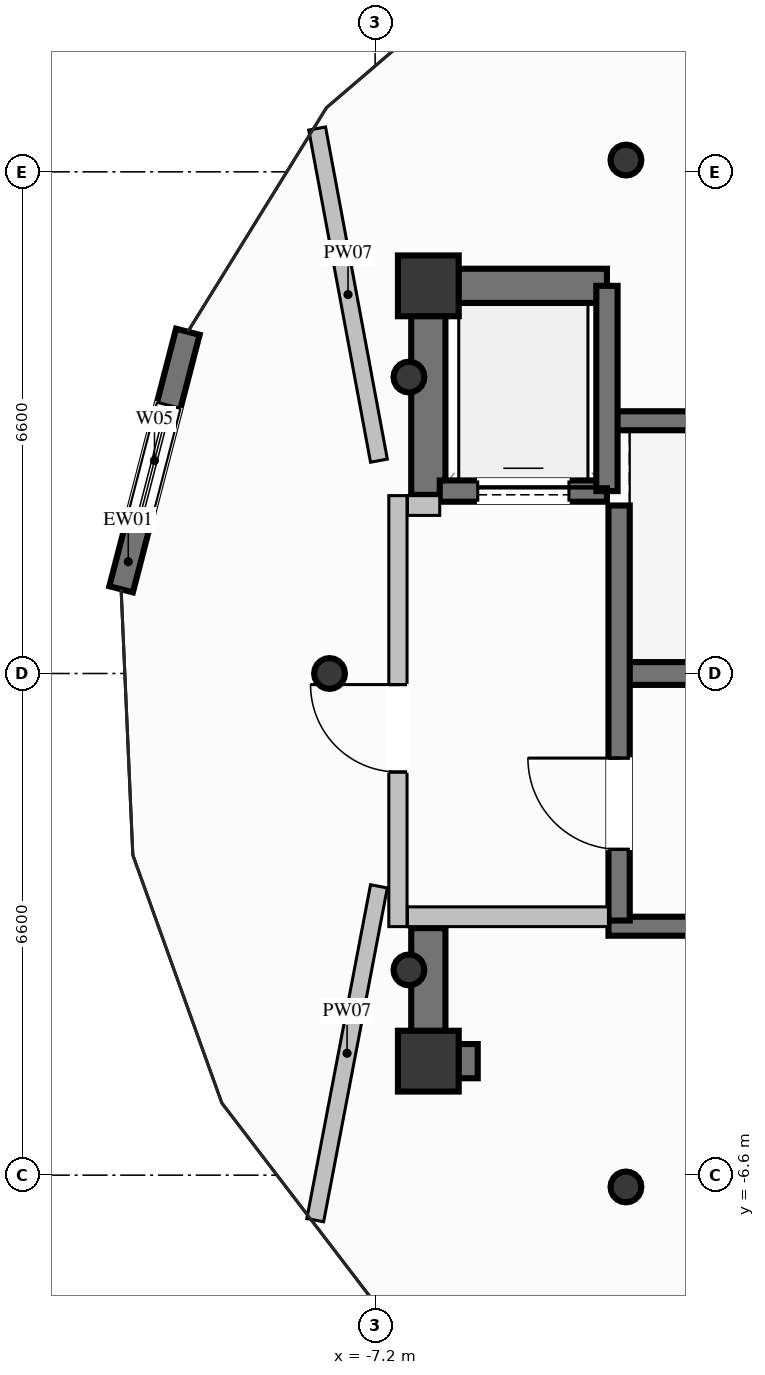
"""IFC4 building model, lengths in metres.
Left out: names, types, materials, properties, quantities, classifications, styles, units other than length and angle.
Written with IfcOpenShell. Run it as: python <this file> out.ifc"""

import sys

from ifc_helpers import new_model, si_unit, direction, frame, frame_2d, origin, origin_2d, place, context, subcontext, project, spatial, rectangle, hollow_circle, extrude, element, fill, save


model = new_model("IFC4")
c1 = context("Model", 3, precision=1e-05, world=origin(), true_north=direction((0.0, 1.0)))
c2 = subcontext(c1, "Body", "Model", "MODEL_VIEW")
j1 = project(units=[si_unit("LENGTHUNIT", "METRE"), si_unit("PLANEANGLEUNIT", "RADIAN")], contexts=[c1])
p1 = place(None, origin())
s1 = spatial("IfcSite", under=j1, at=p1, CompositionType="ELEMENT")
p2 = place(p1, origin())
s2 = spatial("IfcBuilding", under=s1, at=p2, CompositionType="ELEMENT")
p3 = place(p2, frame((0.0, 0.0, 321.0)))
s3 = spatial("IfcBuildingStorey", under=s2, at=p3, CompositionType="ELEMENT", Elevation=321.0)
for number, where, z_axis, x_axis in (
    (1, (-6.5, -5.1, 0.0), (0.0, 0.0, 1.0), (1.0, 0.0, 0.0)),
    (2, (-6.5, 5.1, 0.0), (0.0, 0.0, 1.0), (1.0, 0.0, 0.0)),
):
    element("IfcColumn", number, at=place(p3, frame(where, z_axis=z_axis, x_axis=x_axis)), inside=s3, PredefinedType="COLUMN", context=c2, shape_type="SweptSolid", body=[
        extrude(rectangle(XDim=0.8, YDim=0.8, at=origin_2d()), origin(), (0.0, 0.0, 1.0), 6.4),
    ])
p4 = place(p3, frame((-3.99, 0.0, 0.0), z_axis=(0.0, 0.0, 1.0), x_axis=(1.0, 0.0, 0.0)))
e3 = element("IfcWall", 3, at=p4, inside=s3, PredefinedType="SHEAR", context=c2, shape_type="SweptSolid", body=[
    extrude(rectangle(XDim=7.98, YDim=0.3, at=frame_2d((3.99, 0.0))), origin(), (0.0, 0.0, 1.0), 6.4),
])
for number, where, z_axis, x_axis in (
    (4, (-4.13, -3.325, 0.0), (0.0, 0.0, 1.0), (1.0, 0.0, 0.0)),
    (5, (-4.13, 3.325, 0.0), (0.0, 0.0, 1.0), (1.0, 0.0, 0.0)),
):
    element("IfcWall", number, at=place(p3, frame(where, z_axis=z_axis, x_axis=x_axis)), inside=s3, PredefinedType="SOLIDWALL", context=c2, shape_type="SweptSolid", body=[
        extrude(rectangle(XDim=8.26, YDim=0.25, at=frame_2d((4.13, 0.0))), origin(), (0.0, 0.0, 1.0), 6.4),
    ])
p5 = place(p3, frame((-6.275, -5.1, 0.0), z_axis=(0.0, 0.0, 1.0), x_axis=(1.0, 0.0, 0.0)))
e6 = element("IfcWall", 6, at=p5, inside=s3, PredefinedType="SHEAR", context=c2, shape_type="SweptSolid", body=[
    extrude(rectangle(XDim=0.425, YDim=0.45, at=frame_2d((0.212, 0.0))), origin(), (0.0, 0.0, 1.0), 6.4),
])
p6 = place(p3, frame((-6.275, 5.1, 0.0), z_axis=(0.0, 0.0, 1.0), x_axis=(1.0, 0.0, 0.0)))
e7 = element("IfcWall", 7, at=p6, inside=s3, PredefinedType="SHEAR", context=c2, shape_type="SweptSolid", body=[
    extrude(rectangle(XDim=2.125, YDim=0.45, at=frame_2d((1.062, 0.0))), origin(), (0.0, 0.0, 1.0), 6.4),
])
p7 = place(p3, frame((-6.5, 2.35, 0.0), z_axis=(0.0, 0.0, 1.0), x_axis=(0.0, 1.0, 0.0)))
e8 = element("IfcWall", 8, at=p7, inside=s3, PredefinedType="SHEAR", context=c2, shape_type="SweptSolid", body=[
    extrude(rectangle(XDim=2.975, YDim=0.45, at=frame_2d((1.487, 0.0))), origin(), (0.0, 0.0, 1.0), 6.4),
])
p8 = place(p3, frame((-6.5, -5.325, 0.0), z_axis=(0.0, 0.0, 1.0), x_axis=(0.0, 1.0, 0.0)))
e9 = element("IfcWall", 9, at=p8, inside=s3, PredefinedType="SHEAR", context=c2, shape_type="SweptSolid", body=[
    extrude(rectangle(XDim=1.975, YDim=0.45, at=frame_2d((0.987, 0.0))), origin(), (0.0, 0.0, 1.0), 6.4),
])
for number, where, z_axis, x_axis in (
    (10, (-3.9, 6.755, 0.0), (0.0, 0.0, 1.0), (1.0, 0.0, 0.0)),
    (11, (-6.755, 3.9, 0.0), (0.0, 0.0, 1.0), (1.0, 0.0, 0.0)),
    (12, (-7.8, 0.0, 0.0), (0.0, 0.0, 1.0), (1.0, 0.0, 0.0)),
    (13, (-6.755, -3.9, 0.0), (0.0, 0.0, 1.0), (1.0, 0.0, 0.0)),
    (14, (-3.9, -6.755, 0.0), (0.0, 0.0, 1.0), (1.0, 0.0, 0.0)),
):
    element("IfcColumn", number, at=place(p3, frame(where, z_axis=z_axis, x_axis=x_axis)), inside=s3, PredefinedType="COLUMN", context=c2, shape_type="SweptSolid", body=[
        extrude(hollow_circle(Radius=0.203, WallThickness=0.016, at=origin_2d()), origin(), (0.0, 0.0, 1.0), 6.4),
    ])
p9 = place(p3, frame((-10.542, 1.108, 0.0), z_axis=(0.0, 0.0, 1.0), x_axis=(0.250831437046, 0.968030779567, 0.0)))
e15 = element("IfcWall", 15, at=p9, inside=s3, PredefinedType="SOLIDWALL", context=c2, shape_type="SweptSolid", body=[
    extrude(rectangle(XDim=3.5, YDim=0.32, at=frame_2d((1.75, 0.0))), origin(), (0.0, 0.0, 1.0), 6.12),
])
p10 = place(p9, frame((1.0, 0.0, 1.1)))
e16 = element("IfcOpeningElement", 16, at=p10, cuts=e15, PredefinedType="OPENING", context=c2, shape_type="SweptSolid", body=[
    extrude(rectangle(XDim=1.5, YDim=1.2, at=frame_2d((0.75, 0.6))), frame((0.0, 0.17, 0.0), z_axis=(0.0, -1.0, 0.0), x_axis=(1.0, 0.0, 0.0)), (0.0, 0.0, 1.0), 0.34),
])
p11 = place(p3, frame((-6.35, 2.4, 0.0), z_axis=(0.0, 0.0, 1.0), x_axis=(1.0, 0.0, 0.0)))
e17 = element("IfcWall", 17, at=p11, inside=s3, PredefinedType="SOLIDWALL", context=c2, shape_type="SweptSolid", body=[
    extrude(rectangle(XDim=2.2, YDim=0.28, at=frame_2d((1.1, 0.0))), origin(), (0.0, 0.0, 1.0), 6.12),
])
p12 = place(p11, frame((0.5, 0.0, 0.0)))
e18 = element("IfcOpeningElement", 18, at=p12, cuts=e17, PredefinedType="OPENING", context=c2, shape_type="SweptSolid", body=[
    extrude(rectangle(XDim=1.2, YDim=2.2, at=frame_2d((0.6, 1.1))), frame((0.0, 0.15, 0.0), z_axis=(0.0, -1.0, 0.0), x_axis=(1.0, 0.0, 0.0)), (0.0, 0.0, 1.0), 0.3),
])
p13 = place(p3, frame((-4.15, 2.4, 0.0), z_axis=(0.0, 0.0, 1.0), x_axis=(0.0, 1.0, 0.0)))
e19 = element("IfcWall", 19, at=p13, inside=s3, PredefinedType="SOLIDWALL", context=c2, shape_type="SweptSolid", body=[
    extrude(rectangle(XDim=2.7, YDim=0.28, at=frame_2d((1.35, 0.0))), origin(), (0.0, 0.0, 1.0), 6.12),
])
p14 = place(p3, frame((-3.99, -3.25, 0.0), z_axis=(0.0, 0.0, 1.0), x_axis=(0.0, 1.0, 0.0)))
e20 = element("IfcWall", 20, at=p14, inside=s3, PredefinedType="SOLIDWALL", context=c2, shape_type="SweptSolid", body=[
    extrude(rectangle(XDim=5.46, YDim=0.28, at=frame_2d((2.73, 0.0))), origin(), (0.0, 0.0, 1.0), 6.12),
])
p15 = place(p14, frame((0.937, 0.0, 0.0)))
e21 = element("IfcOpeningElement", 21, at=p15, cuts=e20, PredefinedType="OPENING", context=c2, shape_type="SweptSolid", body=[
    extrude(rectangle(XDim=1.2, YDim=2.2, at=frame_2d((0.6, 1.1))), frame((0.0, 0.15, 0.0), z_axis=(0.0, -1.0, 0.0), x_axis=(1.0, 0.0, 0.0)), (0.0, 0.0, 1.0), 0.3),
])
p16 = place(p3, frame((-6.9, -3.33, 0.0), z_axis=(0.0, 0.0, 1.0), x_axis=(0.0, 1.0, 0.0)))
e22 = element("IfcWall", 22, at=p16, inside=s3, PredefinedType="PARTITIONING", context=c2, shape_type="SweptSolid", body=[
    extrude(rectangle(XDim=5.67, YDim=0.24, at=frame_2d((2.835, 0.0))), origin(), (0.0, 0.0, 1.0), 5.005),
])
p17 = place(p16, frame((2.034, 0.0, 0.0)))
e23 = element("IfcOpeningElement", 23, at=p17, cuts=e22, PredefinedType="OPENING", context=c2, shape_type="SweptSolid", body=[
    extrude(rectangle(XDim=1.15, YDim=2.2, at=frame_2d((0.575, 1.1))), frame((0.0, 0.13, 0.0), z_axis=(0.0, -1.0, 0.0), x_axis=(1.0, 0.0, 0.0)), (0.0, 0.0, 1.0), 0.26),
])
p18 = place(p3, frame((-6.775, -3.2, 0.0), z_axis=(0.0, 0.0, 1.0), x_axis=(1.0, 0.0, 0.0)))
e24 = element("IfcWall", 24, at=p18, inside=s3, PredefinedType="PARTITIONING", context=c2, shape_type="SweptSolid", body=[
    extrude(rectangle(XDim=2.645, YDim=0.26, at=frame_2d((1.323, 0.0))), origin(), (0.0, 0.0, 1.0), 6.12),
])
p19 = place(p3, frame((-6.775, 2.21, 0.0), z_axis=(0.0, 0.0, 1.0), x_axis=(1.0, 0.0, 0.0)))
e25 = element("IfcWall", 25, at=p19, inside=s3, PredefinedType="PARTITIONING", context=c2, shape_type="SweptSolid", body=[
    extrude(rectangle(XDim=0.425, YDim=0.26, at=frame_2d((0.212, 0.0))), origin(), (0.0, 0.0, 1.0), 6.12),
])
p20 = place(p3, frame((-7.15, 2.8, 0.0), z_axis=(0.0, 0.0, 1.0), x_axis=(-0.182905446928, 0.983130508877, 0.0)))
e26 = element("IfcWall", 26, at=p20, inside=s3, PredefinedType="PARTITIONING", context=c2, shape_type="SweptSolid", body=[
    extrude(rectangle(XDim=4.445, YDim=0.225, at=frame_2d((2.222, 0.0))), origin(), (0.0, 0.0, 1.0), 5.005),
])
p21 = place(p3, frame((-7.15, -2.8, 0.0), z_axis=(0.0, 0.0, 1.0), x_axis=(-0.187455851304, -0.982273029158, 0.0)))
e27 = element("IfcWall", 27, at=p21, inside=s3, PredefinedType="PARTITIONING", context=c2, shape_type="SweptSolid", body=[
    extrude(rectangle(XDim=4.471, YDim=0.225, at=frame_2d((2.236, 0.0))), origin(), (0.0, 0.0, 1.0), 5.005),
])
p22 = place(p10, origin())
e28 = element("IfcWindow", 28, at=p22, inside=s3, PartitioningType="SINGLE_PANEL", PredefinedType="WINDOW", context=c2, shape_type="SweptSolid", body=[
    extrude(rectangle(XDim=1.5, YDim=1.2, at=frame_2d((0.75, 0.6))), frame((0.0, 0.03, 0.0), z_axis=(0.0, -1.0, 0.0), x_axis=(1.0, 0.0, 0.0)), (0.0, 0.0, 1.0), 0.06),
])
fill(e16, e28)
p23 = place(p12, origin())
e29 = element("IfcDoor", 29, at=p23, inside=s3, OperationType="SLIDING_TO_LEFT", PredefinedType="DOOR", context=c2, shape_type="SweptSolid", body=[
    extrude(rectangle(XDim=1.2, YDim=2.2, at=frame_2d((0.6, 1.1))), frame((0.0, 0.025, 0.0), z_axis=(0.0, -1.0, 0.0), x_axis=(1.0, 0.0, 0.0)), (0.0, 0.0, 1.0), 0.05),
])
fill(e18, e29)
p24 = place(p15, origin())
e30 = element("IfcDoor", 30, at=p24, inside=s3, OperationType="SINGLE_SWING_RIGHT", PredefinedType="DOOR", context=c2, shape_type="SweptSolid", body=[
    extrude(rectangle(XDim=1.2, YDim=2.2, at=frame_2d((0.6, 1.1))), frame((0.0, 0.025, 0.0), z_axis=(0.0, -1.0, 0.0), x_axis=(1.0, 0.0, 0.0)), (0.0, 0.0, 1.0), 0.05),
])
fill(e21, e30)
p25 = place(p17, origin())
e31 = element("IfcDoor", 31, at=p25, inside=s3, OperationType="SINGLE_SWING_RIGHT", PredefinedType="DOOR", context=c2, shape_type="SweptSolid", body=[
    extrude(rectangle(XDim=1.15, YDim=2.2, at=frame_2d((0.575, 1.1))), frame((0.0, 0.025, 0.0), z_axis=(0.0, -1.0, 0.0), x_axis=(1.0, 0.0, 0.0)), (0.0, 0.0, 1.0), 0.05),
])
fill(e23, e31)
save(model, sys.argv[1])
